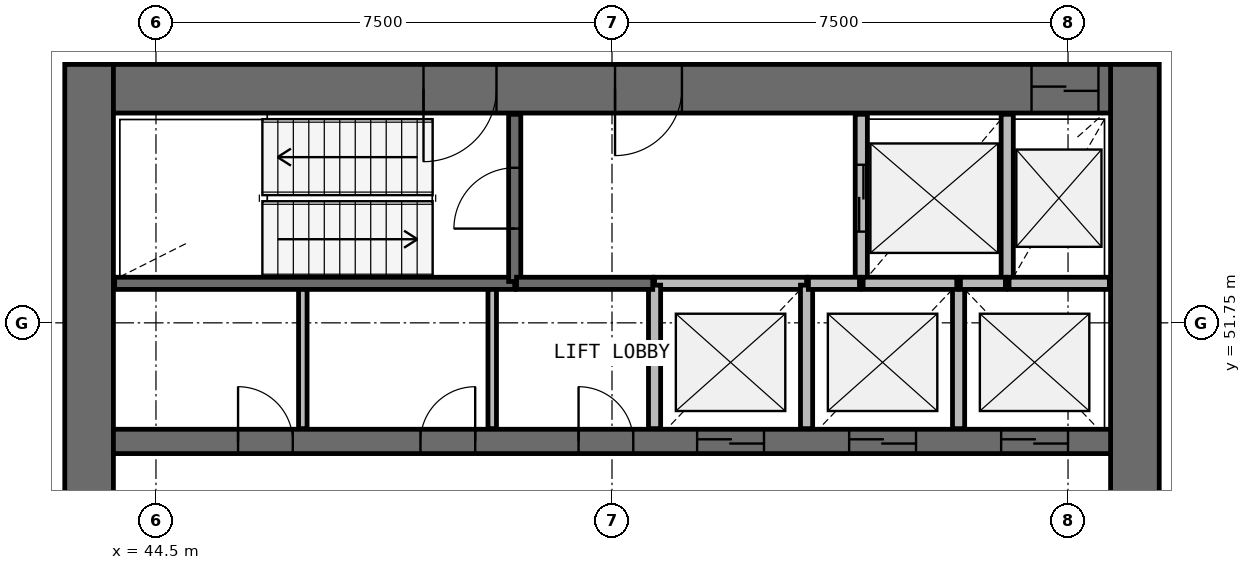
"""IFC4 building model, lengths in metres.
Left out: names, types, materials, properties, quantities, classifications, styles, units other than length and angle.
Written with IfcOpenShell. Run it as: python <this file> out.ifc"""

import sys

from ifc_helpers import new_model, si_unit, direction, frame, frame_2d, origin, place, context, subcontext, project, spatial, rectangle, extrude, source, transform, mapped, element, fill, save


model = new_model("IFC4")
c1 = context("Model", 3, precision=1e-05, world=origin(), true_north=direction((0.0, 1.0)))
c2 = subcontext(c1, "Body", "Model", "MODEL_VIEW")
j1 = project(units=[si_unit("LENGTHUNIT", "METRE"), si_unit("PLANEANGLEUNIT", "RADIAN")], contexts=[c1])
p1 = place(None, origin())
s1 = spatial("IfcSite", under=j1, at=p1, CompositionType="ELEMENT")
p2 = place(p1, origin())
s2 = spatial("IfcBuilding", under=s1, at=p2, CompositionType="ELEMENT")
p3 = place(p2, frame((0.0, 0.0, 168.2)))
s3 = spatial("IfcBuildingStorey", under=s2, at=p3, CompositionType="ELEMENT", Elevation=168.2)
p4 = place(p3, frame((60.6, 40.0, 0.0), z_axis=(0.0, 0.0, 1.0), x_axis=(0.0, 1.0, 0.0)))
e1 = element("IfcWall", 1, at=p4, inside=s3, PredefinedType="SHEAR", context=c2, shape_type="SweptSolid", body=[
    extrude(rectangle(XDim=16.0, YDim=0.8, at=frame_2d((8.0, 0.0))), origin(), (0.0, 0.0, 1.0), 3.9),
])
p5 = place(p4, frame((7.1, 0.0, 0.0)))
e2 = element("IfcOpeningElement", 2, at=p5, cuts=e1, PredefinedType="OPENING", context=c2, shape_type="SweptSolid", body=[
    extrude(rectangle(XDim=1.8, YDim=2.1, at=frame_2d((0.9, 1.05))), frame((0.0, 0.41, 0.0), z_axis=(0.0, -1.0, 0.0), x_axis=(1.0, 0.0, 0.0)), (0.0, 0.0, 1.0), 0.82),
])
p6 = place(p3, frame((43.4, 56.0, 0.0), z_axis=(0.0, 0.0, 1.0), x_axis=(0.0, -1.0, 0.0)))
e3 = element("IfcWall", 3, at=p6, inside=s3, PredefinedType="SHEAR", context=c2, shape_type="SweptSolid", body=[
    extrude(rectangle(XDim=16.0, YDim=0.8, at=frame_2d((8.0, 0.0))), origin(), (0.0, 0.0, 1.0), 3.9),
])
p7 = place(p6, frame((7.1, 0.0, 0.0)))
e4 = element("IfcOpeningElement", 4, at=p7, cuts=e3, PredefinedType="OPENING", context=c2, shape_type="SweptSolid", body=[
    extrude(rectangle(XDim=1.8, YDim=2.1, at=frame_2d((0.9, 1.05))), frame((0.0, 0.41, 0.0), z_axis=(0.0, -1.0, 0.0), x_axis=(1.0, 0.0, 0.0)), (0.0, 0.0, 1.0), 0.82),
])
p8 = place(p3, frame((60.2, 55.6, 0.0), z_axis=(0.0, 0.0, 1.0), x_axis=(-1.0, 0.0, 0.0)))
e5 = element("IfcWall", 5, at=p8, inside=s3, PredefinedType="SHEAR", context=c2, shape_type="SweptSolid", body=[
    extrude(rectangle(XDim=16.4, YDim=0.8, at=frame_2d((8.2, 0.0))), origin(), (0.0, 0.0, 1.0), 3.9),
])
p9 = place(p8, frame((0.2, 0.0, 0.0)))
e6 = element("IfcOpeningElement", 6, at=p9, cuts=e5, PredefinedType="OPENING", context=c2, shape_type="SweptSolid", body=[
    extrude(rectangle(XDim=1.1, YDim=2.1, at=frame_2d((0.55, 1.05))), frame((0.0, 0.41, 0.0), z_axis=(0.0, -1.0, 0.0), x_axis=(1.0, 0.0, 0.0)), (0.0, 0.0, 1.0), 0.82),
])
p10 = place(p8, frame((10.1, 0.0, 0.0)))
e7 = element("IfcOpeningElement", 7, at=p10, cuts=e5, PredefinedType="OPENING", context=c2, shape_type="SweptSolid", body=[
    extrude(rectangle(XDim=1.2, YDim=2.1, at=frame_2d((0.6, 1.05))), frame((0.0, 0.41, 0.0), z_axis=(0.0, -1.0, 0.0), x_axis=(1.0, 0.0, 0.0)), (0.0, 0.0, 1.0), 0.82),
])
p11 = place(p8, frame((7.05, 0.0, 0.0)))
e8 = element("IfcOpeningElement", 8, at=p11, cuts=e5, PredefinedType="OPENING", context=c2, shape_type="SweptSolid", body=[
    extrude(rectangle(XDim=1.1, YDim=2.1, at=frame_2d((0.55, 1.05))), frame((0.0, 0.41, 0.0), z_axis=(0.0, -1.0, 0.0), x_axis=(1.0, 0.0, 0.0)), (0.0, 0.0, 1.0), 0.82),
])
p12 = place(p3, frame((43.8, 49.8, 0.0), z_axis=(0.0, 0.0, 1.0), x_axis=(1.0, 0.0, 0.0)))
e9 = element("IfcWall", 9, at=p12, inside=s3, PredefinedType="SHEAR", context=c2, shape_type="SweptSolid", body=[
    extrude(rectangle(XDim=16.4, YDim=0.4, at=frame_2d((8.2, 0.0))), origin(), (0.0, 0.0, 1.0), 3.9),
])
p13 = place(p12, frame((9.6, 0.0, 0.0)))
e10 = element("IfcOpeningElement", 10, at=p13, cuts=e9, PredefinedType="OPENING", context=c2, shape_type="SweptSolid", body=[
    extrude(rectangle(XDim=1.1, YDim=2.1, at=frame_2d((0.55, 1.05))), frame((0.0, 0.21, 0.0), z_axis=(0.0, -1.0, 0.0), x_axis=(1.0, 0.0, 0.0)), (0.0, 0.0, 1.0), 0.42),
])
p14 = place(p12, frame((12.1, 0.0, 0.0)))
e11 = element("IfcOpeningElement", 11, at=p14, cuts=e9, PredefinedType="OPENING", context=c2, shape_type="SweptSolid", body=[
    extrude(rectangle(XDim=1.1, YDim=2.1, at=frame_2d((0.55, 1.05))), frame((0.0, 0.21, 0.0), z_axis=(0.0, -1.0, 0.0), x_axis=(1.0, 0.0, 0.0)), (0.0, 0.0, 1.0), 0.42),
])
p15 = place(p12, frame((14.6, 0.0, 0.0)))
e12 = element("IfcOpeningElement", 12, at=p15, cuts=e9, PredefinedType="OPENING", context=c2, shape_type="SweptSolid", body=[
    extrude(rectangle(XDim=1.1, YDim=2.1, at=frame_2d((0.55, 1.05))), frame((0.0, 0.21, 0.0), z_axis=(0.0, -1.0, 0.0), x_axis=(1.0, 0.0, 0.0)), (0.0, 0.0, 1.0), 0.42),
])
p16 = place(p12, frame((2.05, 0.0, 0.0)))
e13 = element("IfcOpeningElement", 13, at=p16, cuts=e9, PredefinedType="OPENING", context=c2, shape_type="SweptSolid", body=[
    extrude(rectangle(XDim=0.9, YDim=2.1, at=frame_2d((0.45, 1.05))), frame((0.0, 0.21, 0.0), z_axis=(0.0, -1.0, 0.0), x_axis=(1.0, 0.0, 0.0)), (0.0, 0.0, 1.0), 0.42),
])
p17 = place(p12, frame((5.05, 0.0, 0.0)))
e14 = element("IfcOpeningElement", 14, at=p17, cuts=e9, PredefinedType="OPENING", context=c2, shape_type="SweptSolid", body=[
    extrude(rectangle(XDim=0.9, YDim=2.1, at=frame_2d((0.45, 1.05))), frame((0.0, 0.21, 0.0), z_axis=(0.0, -1.0, 0.0), x_axis=(1.0, 0.0, 0.0)), (0.0, 0.0, 1.0), 0.42),
])
p18 = place(p12, frame((7.65, 0.0, 0.0)))
e15 = element("IfcOpeningElement", 15, at=p18, cuts=e9, PredefinedType="OPENING", context=c2, shape_type="SweptSolid", body=[
    extrude(rectangle(XDim=0.9, YDim=2.1, at=frame_2d((0.45, 1.05))), frame((0.0, 0.21, 0.0), z_axis=(0.0, -1.0, 0.0), x_axis=(1.0, 0.0, 0.0)), (0.0, 0.0, 1.0), 0.42),
])
p19 = place(p3, frame((43.82, 52.4, 0.0), z_axis=(0.0, 0.0, 1.0), x_axis=(1.0, 0.0, 0.0)))
e16 = element("IfcWall", 16, at=p19, inside=s3, PredefinedType="SOLIDWALL", context=c2, shape_type="SweptSolid", body=[
    extrude(rectangle(XDim=6.58, YDim=0.2, at=frame_2d((3.29, 0.0))), origin(), (0.0, 0.0, 1.0), 3.58),
])
p20 = place(p3, frame((50.4, 52.43, 0.0), z_axis=(0.0, 0.0, 1.0), x_axis=(0.0, 1.0, 0.0)))
e17 = element("IfcWall", 17, at=p20, inside=s3, PredefinedType="SOLIDWALL", context=c2, shape_type="SweptSolid", body=[
    extrude(rectangle(XDim=2.75, YDim=0.2, at=frame_2d((1.375, 0.0))), origin(), (0.0, 0.0, 1.0), 3.58),
])
p21 = place(p20, frame((0.87, 0.0, 0.0)))
e18 = element("IfcOpeningElement", 18, at=p21, cuts=e17, PredefinedType="OPENING", context=c2, shape_type="SweptSolid", body=[
    extrude(rectangle(XDim=1.0, YDim=2.1, at=frame_2d((0.5, 1.05))), frame((0.0, 0.11, 0.0), z_axis=(0.0, -1.0, 0.0), x_axis=(1.0, 0.0, 0.0)), (0.0, 0.0, 1.0), 0.22),
])
p22 = place(p3, frame((56.1, 55.18, 0.0), z_axis=(0.0, 0.0, 1.0), x_axis=(0.0, -1.0, 0.0)))
e19 = element("IfcWall", 19, at=p22, inside=s3, PredefinedType="SOLIDWALL", context=c2, shape_type="SweptSolid", body=[
    extrude(rectangle(XDim=2.78, YDim=0.2, at=frame_2d((1.39, 0.0))), origin(), (0.0, 0.0, 1.0), 3.58),
])
p23 = place(p22, frame((0.83, 0.0, 0.0)))
e20 = element("IfcOpeningElement", 20, at=p23, cuts=e19, PredefinedType="OPENING", context=c2, shape_type="SweptSolid", body=[
    extrude(rectangle(XDim=1.1, YDim=2.1, at=frame_2d((0.55, 1.05))), frame((0.0, 0.11, 0.0), z_axis=(0.0, -1.0, 0.0), x_axis=(1.0, 0.0, 0.0)), (0.0, 0.0, 1.0), 0.22),
])
p24 = place(p3, frame((58.5, 52.4, 0.0), z_axis=(0.0, 0.0, 1.0), x_axis=(0.0, 1.0, 0.0)))
e21 = element("IfcWall", 21, at=p24, inside=s3, PredefinedType="SOLIDWALL", context=c2, shape_type="SweptSolid", body=[
    extrude(rectangle(XDim=2.78, YDim=0.2, at=frame_2d((1.39, 0.0))), origin(), (0.0, 0.0, 1.0), 3.58),
])
p25 = place(p3, frame((55.2, 52.4, 0.0), z_axis=(0.0, 0.0, 1.0), x_axis=(-1.0, 0.0, 0.0)))
e22 = element("IfcWall", 22, at=p25, inside=s3, PredefinedType="SOLIDWALL", context=c2, shape_type="SweptSolid", body=[
    extrude(rectangle(XDim=2.5, YDim=0.2, at=frame_2d((1.25, 0.0))), origin(), (0.0, 0.0, 1.0), 3.58),
])
for number, where, z_axis, x_axis in (
    (23, (52.7, 52.37, 0.0), (0.0, 0.0, 1.0), (0.0, -1.0, 0.0)),
    (24, (55.2, 50.01, 0.0), (0.0, 0.0, 1.0), (0.0, 1.0, 0.0)),
):
    element("IfcWall", number, at=place(p3, frame(where, z_axis=z_axis, x_axis=x_axis)), inside=s3, PredefinedType="SOLIDWALL", context=c2, shape_type="SweptSolid", body=[
        extrude(rectangle(XDim=2.36, YDim=0.2, at=frame_2d((1.18, 0.0))), origin(), (0.0, 0.0, 1.0), 3.58),
    ])
p26 = place(p3, frame((57.7, 50.01, 0.0), z_axis=(0.0, 0.0, 1.0), x_axis=(0.0, 1.0, 0.0)))
e25 = element("IfcWall", 25, at=p26, inside=s3, PredefinedType="SOLIDWALL", context=c2, shape_type="SweptSolid", body=[
    extrude(rectangle(XDim=2.39, YDim=0.2, at=frame_2d((1.195, 0.0))), origin(), (0.0, 0.0, 1.0), 3.58),
])
p27 = place(p3, frame((50.43, 52.4, 0.0), z_axis=(0.0, 0.0, 1.0), x_axis=(1.0, 0.0, 0.0)))
e26 = element("IfcWall", 26, at=p27, inside=s3, PredefinedType="SOLIDWALL", context=c2, shape_type="SweptSolid", body=[
    extrude(rectangle(XDim=2.24, YDim=0.2, at=frame_2d((1.12, 0.0))), origin(), (0.0, 0.0, 1.0), 3.58),
])
p28 = place(p3, frame((60.18, 52.4, 0.0), z_axis=(0.0, 0.0, 1.0), x_axis=(-1.0, 0.0, 0.0)))
e27 = element("IfcWall", 27, at=p28, inside=s3, PredefinedType="SOLIDWALL", context=c2, shape_type="SweptSolid", body=[
    extrude(rectangle(XDim=1.65, YDim=0.2, at=frame_2d((0.825, 0.0))), origin(), (0.0, 0.0, 1.0), 3.58),
])
p29 = place(p3, frame((57.67, 52.4, 0.0), z_axis=(0.0, 0.0, 1.0), x_axis=(-1.0, 0.0, 0.0)))
e28 = element("IfcWall", 28, at=p29, inside=s3, PredefinedType="SOLIDWALL", context=c2, shape_type="SweptSolid", body=[
    extrude(rectangle(XDim=1.54, YDim=0.2, at=frame_2d((0.77, 0.0))), origin(), (0.0, 0.0, 1.0), 3.58),
])
p30 = place(p3, frame((56.07, 52.4, 0.0), z_axis=(0.0, 0.0, 1.0), x_axis=(-1.0, 0.0, 0.0)))
e29 = element("IfcWall", 29, at=p30, inside=s3, PredefinedType="SOLIDWALL", context=c2, shape_type="SweptSolid", body=[
    extrude(rectangle(XDim=0.84, YDim=0.2, at=frame_2d((0.42, 0.0))), origin(), (0.0, 0.0, 1.0), 3.58),
])
p31 = place(p3, frame((58.47, 52.4, 0.0), z_axis=(0.0, 0.0, 1.0), x_axis=(-1.0, 0.0, 0.0)))
e30 = element("IfcWall", 30, at=p31, inside=s3, PredefinedType="SOLIDWALL", context=c2, shape_type="SweptSolid", body=[
    extrude(rectangle(XDim=0.74, YDim=0.2, at=frame_2d((0.37, 0.0))), origin(), (0.0, 0.0, 1.0), 3.58),
])
for number, where, z_axis, x_axis in (
    (31, (46.915, 50.01, 0.0), (0.0, 0.0, 1.0), (0.0, 1.0, 0.0)),
    (32, (50.03, 50.01, 0.0), (0.0, 0.0, 1.0), (0.0, 1.0, 0.0)),
):
    element("IfcWall", number, at=place(p3, frame(where, z_axis=z_axis, x_axis=x_axis)), inside=s3, PredefinedType="PARTITIONING", context=c2, shape_type="SweptSolid", body=[
        extrude(rectangle(XDim=2.29, YDim=0.14, at=frame_2d((1.145, 0.0))), origin(), (0.0, 0.0, 1.0), 2.88),
    ])
m1 = source(origin(), c2, "Body", "SweptSolid", [
    extrude(rectangle(XDim=1.1, YDim=2.1, at=frame_2d((0.55, 1.05))), frame((0.0, 0.025, 0.0), z_axis=(0.0, -1.0, 0.0), x_axis=(1.0, 0.0, 0.0)), (0.0, 0.0, 1.0), 0.05),
])
p32 = place(p13, origin())
e33 = element("IfcDoor", 33, at=p32, inside=s3, OperationType="DOUBLE_DOOR_SLIDING", PredefinedType="USERDEFINED", context=c2, shape_type="MappedRepresentation", body=[
    mapped(m1, transform((0.0, 0.0, 0.0), scale=1.0)),
])
fill(e10, e33)
p33 = place(p14, origin())
e34 = element("IfcDoor", 34, at=p33, inside=s3, OperationType="DOUBLE_DOOR_SLIDING", PredefinedType="USERDEFINED", context=c2, shape_type="MappedRepresentation", body=[
    mapped(m1, transform((0.0, 0.0, 0.0), scale=1.0)),
])
fill(e11, e34)
p34 = place(p15, origin())
e35 = element("IfcDoor", 35, at=p34, inside=s3, OperationType="DOUBLE_DOOR_SLIDING", PredefinedType="USERDEFINED", context=c2, shape_type="MappedRepresentation", body=[
    mapped(m1, transform((0.0, 0.0, 0.0), scale=1.0)),
])
fill(e12, e35)
p35 = place(p23, origin())
e36 = element("IfcDoor", 36, at=p35, inside=s3, OperationType="DOUBLE_DOOR_SLIDING", PredefinedType="USERDEFINED", context=c2, shape_type="MappedRepresentation", body=[
    mapped(m1, transform((0.0, 0.0, 0.0), scale=1.0)),
])
fill(e20, e36)
p36 = place(p9, origin())
e37 = element("IfcDoor", 37, at=p36, inside=s3, OperationType="DOUBLE_DOOR_SLIDING", PredefinedType="USERDEFINED", context=c2, shape_type="MappedRepresentation", body=[
    mapped(m1, transform((0.0, 0.0, 0.0), scale=1.0)),
])
fill(e6, e37)
m2 = source(origin(), c2, "Body", "SweptSolid", [
    extrude(rectangle(XDim=1.2, YDim=2.1, at=frame_2d((0.6, 1.05))), frame((0.0, 0.025, 0.0), z_axis=(0.0, -1.0, 0.0), x_axis=(1.0, 0.0, 0.0)), (0.0, 0.0, 1.0), 0.05),
])
p37 = place(p10, origin())
e38 = element("IfcDoor", 38, at=p37, inside=s3, OperationType="SINGLE_SWING_RIGHT", PredefinedType="DOOR", context=c2, shape_type="MappedRepresentation", body=[
    mapped(m2, transform((0.0, 0.0, 0.0), scale=1.0)),
])
fill(e7, e38)
m3 = source(origin(), c2, "Body", "SweptSolid", [
    extrude(rectangle(XDim=1.0, YDim=2.1, at=frame_2d((0.5, 1.05))), frame((0.0, 0.025, 0.0), z_axis=(0.0, -1.0, 0.0), x_axis=(1.0, 0.0, 0.0)), (0.0, 0.0, 1.0), 0.05),
])
p38 = place(p21, origin())
e39 = element("IfcDoor", 39, at=p38, inside=s3, OperationType="SINGLE_SWING_LEFT", PredefinedType="DOOR", context=c2, shape_type="MappedRepresentation", body=[
    mapped(m3, transform((0.0, 0.0, 0.0), scale=1.0)),
])
fill(e18, e39)
m4 = source(origin(), c2, "Body", "SweptSolid", [
    extrude(rectangle(XDim=1.1, YDim=2.1, at=frame_2d((0.55, 1.05))), frame((0.0, 0.025, 0.0), z_axis=(0.0, -1.0, 0.0), x_axis=(1.0, 0.0, 0.0)), (0.0, 0.0, 1.0), 0.05),
])
p39 = place(p11, origin())
e40 = element("IfcDoor", 40, at=p39, inside=s3, OperationType="SINGLE_SWING_RIGHT", PredefinedType="DOOR", context=c2, shape_type="MappedRepresentation", body=[
    mapped(m4, transform((0.0, 0.0, 0.0), scale=1.0)),
])
fill(e8, e40)
m5 = source(origin(), c2, "Body", "SweptSolid", [
    extrude(rectangle(XDim=0.9, YDim=2.1, at=frame_2d((0.45, 1.05))), frame((0.0, 0.025, 0.0), z_axis=(0.0, -1.0, 0.0), x_axis=(1.0, 0.0, 0.0)), (0.0, 0.0, 1.0), 0.05),
])
p40 = place(p16, origin())
e41 = element("IfcDoor", 41, at=p40, inside=s3, OperationType="SINGLE_SWING_LEFT", PredefinedType="DOOR", context=c2, shape_type="MappedRepresentation", body=[
    mapped(m5, transform((0.0, 0.0, 0.0), scale=1.0)),
])
fill(e13, e41)
p41 = place(p17, origin())
e42 = element("IfcDoor", 42, at=p41, inside=s3, OperationType="SINGLE_SWING_RIGHT", PredefinedType="DOOR", context=c2, shape_type="MappedRepresentation", body=[
    mapped(m5, transform((0.0, 0.0, 0.0), scale=1.0)),
])
fill(e14, e42)
p42 = place(p18, origin())
e43 = element("IfcDoor", 43, at=p42, inside=s3, OperationType="SINGLE_SWING_LEFT", PredefinedType="DOOR", context=c2, shape_type="MappedRepresentation", body=[
    mapped(m5, transform((0.0, 0.0, 0.0), scale=1.0)),
])
fill(e15, e43)
save(model, sys.argv[1])
